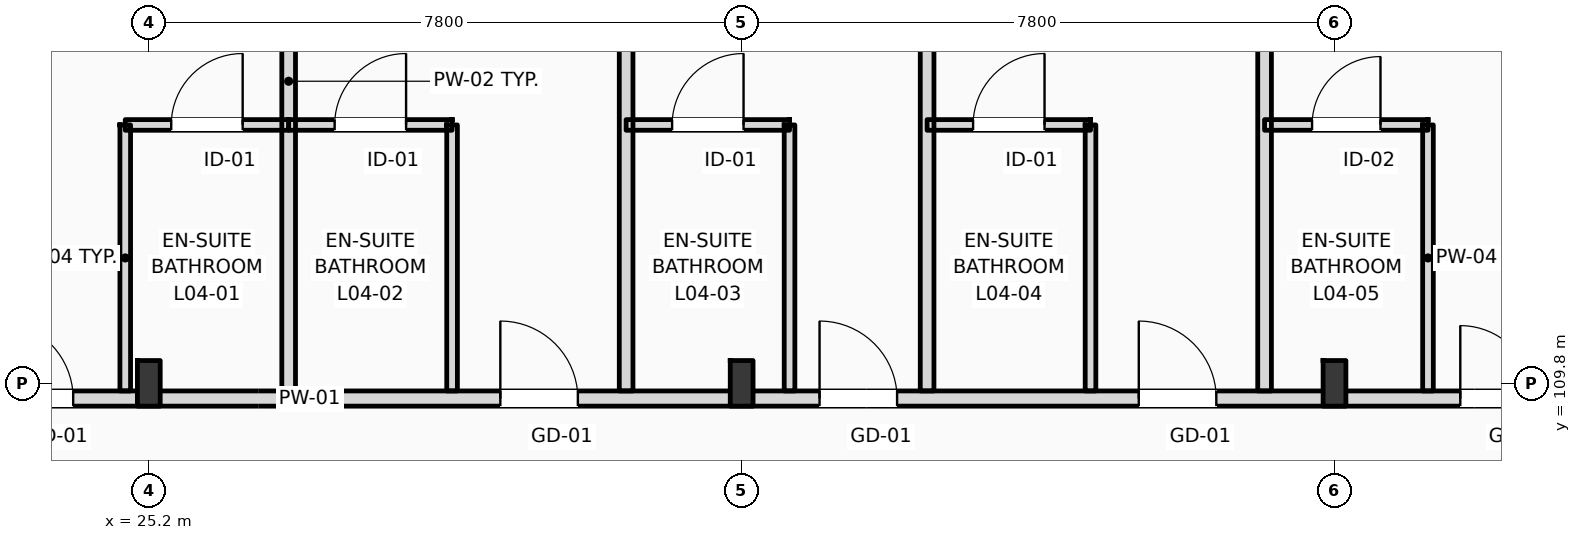
"""IFC4 building model, lengths in metres.
Left out: names, types, materials, properties, quantities, classifications, styles, units other than length and angle.
Written with IfcOpenShell. Run it as: python <this file> out.ifc"""

import sys

from ifc_helpers import new_model, si_unit, direction, frame, frame_2d, origin, origin_2d, place, context, subcontext, project, spatial, rectangle, i_section, extrude, element, fill, save


model = new_model("IFC4")
c1 = context("Model", 3, precision=1e-05, world=origin(), true_north=direction((0.0, 1.0)))
c2 = subcontext(c1, "Body", "Model", "MODEL_VIEW")
j1 = project(units=[si_unit("LENGTHUNIT", "METRE"), si_unit("PLANEANGLEUNIT", "RADIAN")], contexts=[c1])
p1 = place(None, origin())
s1 = spatial("IfcSite", under=j1, at=p1, CompositionType="ELEMENT")
p2 = place(p1, origin())
s2 = spatial("IfcBuilding", under=s1, at=p2, CompositionType="ELEMENT")
p3 = place(p2, frame((0.0, 0.0, 20.4)))
s3 = spatial("IfcBuildingStorey", under=s2, at=p3, CompositionType="ELEMENT", Elevation=20.4)
for number, where, z_axis, x_axis in (
    (1, (25.2, 109.8, 0.0), (0.0, 0.0, 1.0), (1.0, 0.0, 0.0)),
    (2, (33.0, 109.8, 0.0), (0.0, 0.0, 1.0), (1.0, 0.0, 0.0)),
    (3, (40.8, 109.8, 0.0), (0.0, 0.0, 1.0), (1.0, 0.0, 0.0)),
):
    element("IfcColumn", number, at=place(p3, frame(where, z_axis=z_axis, x_axis=x_axis)), inside=s3, PredefinedType="COLUMN", context=c2, shape_type="SweptSolid", body=[
        extrude(i_section(OverallWidth=0.3, OverallDepth=0.6, WebThickness=0.015, FlangeThickness=0.03, FilletRadius=0.027, at=origin_2d()), origin(), (0.0, 0.0, 1.0), 4.2),
    ])
p4 = place(p3, frame((10.65, 109.6, 0.0), z_axis=(0.0, 0.0, 1.0), x_axis=(1.0, 0.0, 0.0)))
e4 = element("IfcWall", 4, at=p4, inside=s3, PredefinedType="PARTITIONING", context=c2, shape_type="SweptSolid", body=[
    extrude(rectangle(XDim=109.21, YDim=0.2, at=frame_2d((54.605, 0.0))), origin(), (0.0, 0.0, 1.0), 3.38),
])
p5 = place(p4, frame((12.535, 0.0, 0.0)))
e5 = element("IfcOpeningElement", 5, at=p5, cuts=e4, PredefinedType="OPENING", context=c2, shape_type="SweptSolid", body=[
    extrude(rectangle(XDim=1.02, YDim=2.2, at=frame_2d((0.51, 1.1))), frame((0.0, 0.11, 0.0), z_axis=(0.0, -1.0, 0.0), x_axis=(1.0, 0.0, 0.0)), (0.0, 0.0, 1.0), 0.22),
])
p6 = place(p4, frame((19.175, 0.0, 0.0)))
e6 = element("IfcOpeningElement", 6, at=p6, cuts=e4, PredefinedType="OPENING", context=c2, shape_type="SweptSolid", body=[
    extrude(rectangle(XDim=1.02, YDim=2.2, at=frame_2d((0.51, 1.1))), frame((0.0, 0.11, 0.0), z_axis=(0.0, -1.0, 0.0), x_axis=(1.0, 0.0, 0.0)), (0.0, 0.0, 1.0), 0.22),
])
p7 = place(p4, frame((23.375, 0.0, 0.0)))
e7 = element("IfcOpeningElement", 7, at=p7, cuts=e4, PredefinedType="OPENING", context=c2, shape_type="SweptSolid", body=[
    extrude(rectangle(XDim=1.02, YDim=2.2, at=frame_2d((0.51, 1.1))), frame((0.0, 0.11, 0.0), z_axis=(0.0, -1.0, 0.0), x_axis=(1.0, 0.0, 0.0)), (0.0, 0.0, 1.0), 0.22),
])
p8 = place(p4, frame((27.575, 0.0, 0.0)))
e8 = element("IfcOpeningElement", 8, at=p8, cuts=e4, PredefinedType="OPENING", context=c2, shape_type="SweptSolid", body=[
    extrude(rectangle(XDim=1.02, YDim=2.2, at=frame_2d((0.51, 1.1))), frame((0.0, 0.11, 0.0), z_axis=(0.0, -1.0, 0.0), x_axis=(1.0, 0.0, 0.0)), (0.0, 0.0, 1.0), 0.22),
])
p9 = place(p4, frame((31.805, 0.0, 0.0)))
e9 = element("IfcOpeningElement", 9, at=p9, cuts=e4, PredefinedType="OPENING", context=c2, shape_type="SweptSolid", body=[
    extrude(rectangle(XDim=0.96, YDim=2.2, at=frame_2d((0.48, 1.1))), frame((0.0, 0.11, 0.0), z_axis=(0.0, -1.0, 0.0), x_axis=(1.0, 0.0, 0.0)), (0.0, 0.0, 1.0), 0.22),
])
p10 = place(p4, frame((33.855, 0.0, 0.0)))
e10 = element("IfcOpeningElement", 10, at=p10, cuts=e4, PredefinedType="OPENING", context=c2, shape_type="SweptSolid", body=[
    extrude(rectangle(XDim=0.96, YDim=2.2, at=frame_2d((0.48, 1.1))), frame((0.0, 0.11, 0.0), z_axis=(0.0, -1.0, 0.0), x_axis=(1.0, 0.0, 0.0)), (0.0, 0.0, 1.0), 0.22),
])
p11 = place(p4, frame((40.205, 0.0, 0.0)))
e11 = element("IfcOpeningElement", 11, at=p11, cuts=e4, PredefinedType="OPENING", context=c2, shape_type="SweptSolid", body=[
    extrude(rectangle(XDim=0.96, YDim=2.2, at=frame_2d((0.48, 1.1))), frame((0.0, 0.11, 0.0), z_axis=(0.0, -1.0, 0.0), x_axis=(1.0, 0.0, 0.0)), (0.0, 0.0, 1.0), 0.22),
])
p12 = place(p4, frame((42.255, 0.0, 0.0)))
e12 = element("IfcOpeningElement", 12, at=p12, cuts=e4, PredefinedType="OPENING", context=c2, shape_type="SweptSolid", body=[
    extrude(rectangle(XDim=0.96, YDim=2.2, at=frame_2d((0.48, 1.1))), frame((0.0, 0.11, 0.0), z_axis=(0.0, -1.0, 0.0), x_axis=(1.0, 0.0, 0.0)), (0.0, 0.0, 1.0), 0.22),
])
p13 = place(p4, frame((48.605, 0.0, 0.0)))
e13 = element("IfcOpeningElement", 13, at=p13, cuts=e4, PredefinedType="OPENING", context=c2, shape_type="SweptSolid", body=[
    extrude(rectangle(XDim=0.96, YDim=2.2, at=frame_2d((0.48, 1.1))), frame((0.0, 0.11, 0.0), z_axis=(0.0, -1.0, 0.0), x_axis=(1.0, 0.0, 0.0)), (0.0, 0.0, 1.0), 0.22),
])
p14 = place(p4, frame((50.655, 0.0, 0.0)))
e14 = element("IfcOpeningElement", 14, at=p14, cuts=e4, PredefinedType="OPENING", context=c2, shape_type="SweptSolid", body=[
    extrude(rectangle(XDim=0.96, YDim=2.2, at=frame_2d((0.48, 1.1))), frame((0.0, 0.11, 0.0), z_axis=(0.0, -1.0, 0.0), x_axis=(1.0, 0.0, 0.0)), (0.0, 0.0, 1.0), 0.22),
])
p15 = place(p4, frame((57.005, 0.0, 0.0)))
e15 = element("IfcOpeningElement", 15, at=p15, cuts=e4, PredefinedType="OPENING", context=c2, shape_type="SweptSolid", body=[
    extrude(rectangle(XDim=0.96, YDim=2.2, at=frame_2d((0.48, 1.1))), frame((0.0, 0.11, 0.0), z_axis=(0.0, -1.0, 0.0), x_axis=(1.0, 0.0, 0.0)), (0.0, 0.0, 1.0), 0.22),
])
p16 = place(p4, frame((59.055, 0.0, 0.0)))
e16 = element("IfcOpeningElement", 16, at=p16, cuts=e4, PredefinedType="OPENING", context=c2, shape_type="SweptSolid", body=[
    extrude(rectangle(XDim=0.96, YDim=2.2, at=frame_2d((0.48, 1.1))), frame((0.0, 0.11, 0.0), z_axis=(0.0, -1.0, 0.0), x_axis=(1.0, 0.0, 0.0)), (0.0, 0.0, 1.0), 0.22),
])
p17 = place(p4, frame((65.405, 0.0, 0.0)))
e17 = element("IfcOpeningElement", 17, at=p17, cuts=e4, PredefinedType="OPENING", context=c2, shape_type="SweptSolid", body=[
    extrude(rectangle(XDim=0.96, YDim=2.2, at=frame_2d((0.48, 1.1))), frame((0.0, 0.11, 0.0), z_axis=(0.0, -1.0, 0.0), x_axis=(1.0, 0.0, 0.0)), (0.0, 0.0, 1.0), 0.22),
])
p18 = place(p4, frame((67.205, 0.0, 0.0)))
e18 = element("IfcOpeningElement", 18, at=p18, cuts=e4, PredefinedType="OPENING", context=c2, shape_type="SweptSolid", body=[
    extrude(rectangle(XDim=0.96, YDim=2.2, at=frame_2d((0.48, 1.1))), frame((0.0, 0.11, 0.0), z_axis=(0.0, -1.0, 0.0), x_axis=(1.0, 0.0, 0.0)), (0.0, 0.0, 1.0), 0.22),
])
p19 = place(p4, frame((73.805, 0.0, 0.0)))
e19 = element("IfcOpeningElement", 19, at=p19, cuts=e4, PredefinedType="OPENING", context=c2, shape_type="SweptSolid", body=[
    extrude(rectangle(XDim=0.96, YDim=2.2, at=frame_2d((0.48, 1.1))), frame((0.0, 0.11, 0.0), z_axis=(0.0, -1.0, 0.0), x_axis=(1.0, 0.0, 0.0)), (0.0, 0.0, 1.0), 0.22),
])
p20 = place(p4, frame((78.255, 0.0, 0.0)))
e20 = element("IfcOpeningElement", 20, at=p20, cuts=e4, PredefinedType="OPENING", context=c2, shape_type="SweptSolid", body=[
    extrude(rectangle(XDim=0.96, YDim=2.2, at=frame_2d((0.48, 1.1))), frame((0.0, 0.11, 0.0), z_axis=(0.0, -1.0, 0.0), x_axis=(1.0, 0.0, 0.0)), (0.0, 0.0, 1.0), 0.22),
])
p21 = place(p4, frame((82.205, 0.0, 0.0)))
e21 = element("IfcOpeningElement", 21, at=p21, cuts=e4, PredefinedType="OPENING", context=c2, shape_type="SweptSolid", body=[
    extrude(rectangle(XDim=0.96, YDim=2.2, at=frame_2d((0.48, 1.1))), frame((0.0, 0.11, 0.0), z_axis=(0.0, -1.0, 0.0), x_axis=(1.0, 0.0, 0.0)), (0.0, 0.0, 1.0), 0.22),
])
p22 = place(p4, frame((86.405, 0.0, 0.0)))
e22 = element("IfcOpeningElement", 22, at=p22, cuts=e4, PredefinedType="OPENING", context=c2, shape_type="SweptSolid", body=[
    extrude(rectangle(XDim=0.96, YDim=2.2, at=frame_2d((0.48, 1.1))), frame((0.0, 0.11, 0.0), z_axis=(0.0, -1.0, 0.0), x_axis=(1.0, 0.0, 0.0)), (0.0, 0.0, 1.0), 0.22),
])
p23 = place(p4, frame((90.605, 0.0, 0.0)))
e23 = element("IfcOpeningElement", 23, at=p23, cuts=e4, PredefinedType="OPENING", context=c2, shape_type="SweptSolid", body=[
    extrude(rectangle(XDim=0.96, YDim=2.2, at=frame_2d((0.48, 1.1))), frame((0.0, 0.11, 0.0), z_axis=(0.0, -1.0, 0.0), x_axis=(1.0, 0.0, 0.0)), (0.0, 0.0, 1.0), 0.22),
])
p24 = place(p4, frame((94.805, 0.0, 0.0)))
e24 = element("IfcOpeningElement", 24, at=p24, cuts=e4, PredefinedType="OPENING", context=c2, shape_type="SweptSolid", body=[
    extrude(rectangle(XDim=0.96, YDim=2.2, at=frame_2d((0.48, 1.1))), frame((0.0, 0.11, 0.0), z_axis=(0.0, -1.0, 0.0), x_axis=(1.0, 0.0, 0.0)), (0.0, 0.0, 1.0), 0.22),
])
p25 = place(p4, frame((99.005, 0.0, 0.0)))
e25 = element("IfcOpeningElement", 25, at=p25, cuts=e4, PredefinedType="OPENING", context=c2, shape_type="SweptSolid", body=[
    extrude(rectangle(XDim=0.96, YDim=2.2, at=frame_2d((0.48, 1.1))), frame((0.0, 0.11, 0.0), z_axis=(0.0, -1.0, 0.0), x_axis=(1.0, 0.0, 0.0)), (0.0, 0.0, 1.0), 0.22),
])
p26 = place(p4, frame((103.205, 0.0, 0.0)))
e26 = element("IfcOpeningElement", 26, at=p26, cuts=e4, PredefinedType="OPENING", context=c2, shape_type="SweptSolid", body=[
    extrude(rectangle(XDim=0.96, YDim=2.2, at=frame_2d((0.48, 1.1))), frame((0.0, 0.11, 0.0), z_axis=(0.0, -1.0, 0.0), x_axis=(1.0, 0.0, 0.0)), (0.0, 0.0, 1.0), 0.22),
])
p27 = place(p4, frame((105.335, 0.0, 0.0)))
e27 = element("IfcOpeningElement", 27, at=p27, cuts=e4, PredefinedType="OPENING", context=c2, shape_type="SweptSolid", body=[
    extrude(rectangle(XDim=0.96, YDim=2.2, at=frame_2d((0.48, 1.1))), frame((0.0, 0.11, 0.0), z_axis=(0.0, -1.0, 0.0), x_axis=(1.0, 0.0, 0.0)), (0.0, 0.0, 1.0), 0.22),
])
p28 = place(p4, frame((2.716, 0.0, 0.0)))
e28 = element("IfcOpeningElement", 28, at=p28, cuts=e4, PredefinedType="OPENING", context=c2, shape_type="SweptSolid", body=[
    extrude(rectangle(XDim=1.35, YDim=2.25, at=frame_2d((0.675, 1.125))), frame((0.0, 0.11, 0.0), z_axis=(0.0, -1.0, 0.0), x_axis=(1.0, 0.0, 0.0)), (0.0, 0.0, 1.0), 0.22),
])
p29 = place(p4, frame((6.65, 0.0, 0.0)))
e29 = element("IfcOpeningElement", 29, at=p29, cuts=e4, PredefinedType="OPENING", context=c2, shape_type="SweptSolid", body=[
    extrude(rectangle(XDim=1.35, YDim=2.25, at=frame_2d((0.675, 1.125))), frame((0.0, 0.11, 0.0), z_axis=(0.0, -1.0, 0.0), x_axis=(1.0, 0.0, 0.0)), (0.0, 0.0, 1.0), 0.22),
])
p30 = place(p4, frame((10.583, 0.0, 0.0)))
e30 = element("IfcOpeningElement", 30, at=p30, cuts=e4, PredefinedType="OPENING", context=c2, shape_type="SweptSolid", body=[
    extrude(rectangle(XDim=1.35, YDim=2.25, at=frame_2d((0.675, 1.125))), frame((0.0, 0.11, 0.0), z_axis=(0.0, -1.0, 0.0), x_axis=(1.0, 0.0, 0.0)), (0.0, 0.0, 1.0), 0.22),
])
p31 = place(p3, frame((27.04, 109.7, 0.0), z_axis=(0.0, 0.0, 1.0), x_axis=(0.0, 1.0, 0.0)))
e31 = element("IfcWall", 31, at=p31, inside=s3, PredefinedType="PARTITIONING", context=c2, shape_type="SweptSolid", body=[
    extrude(rectangle(XDim=8.15, YDim=0.18, at=frame_2d((4.075, 0.0))), origin(), (0.0, 0.0, 1.0), 3.94),
])
p32 = place(p3, frame((24.89, 109.7, 0.0), z_axis=(0.0, 0.0, 1.0), x_axis=(0.0, 1.0, 0.0)))
e32 = element("IfcWall", 32, at=p32, inside=s3, PredefinedType="PARTITIONING", context=c2, shape_type="SweptSolid", body=[
    extrude(rectangle(XDim=3.5, YDim=0.14, at=frame_2d((1.75, 0.0))), origin(), (0.0, 0.0, 1.0), 3.94),
])
p33 = place(p3, frame((24.89, 113.2, 0.0), z_axis=(0.0, 0.0, 1.0), x_axis=(1.0, 0.0, 0.0)))
e33 = element("IfcWall", 33, at=p33, inside=s3, PredefinedType="PARTITIONING", context=c2, shape_type="SweptSolid", body=[
    extrude(rectangle(XDim=2.15, YDim=0.14, at=frame_2d((1.075, 0.0))), origin(), (0.0, 0.0, 1.0), 3.94),
])
p34 = place(p33, frame((0.605, 0.0, 0.0)))
e34 = element("IfcOpeningElement", 34, at=p34, cuts=e33, PredefinedType="OPENING", context=c2, shape_type="SweptSolid", body=[
    extrude(rectangle(XDim=0.94, YDim=2.15, at=frame_2d((0.47, 1.075))), frame((0.0, 0.08, 0.0), z_axis=(0.0, -1.0, 0.0), x_axis=(1.0, 0.0, 0.0)), (0.0, 0.0, 1.0), 0.16),
])
p35 = place(p3, frame((31.48, 109.7, 0.0), z_axis=(0.0, 0.0, 1.0), x_axis=(0.0, 1.0, 0.0)))
e35 = element("IfcWall", 35, at=p35, inside=s3, PredefinedType="PARTITIONING", context=c2, shape_type="SweptSolid", body=[
    extrude(rectangle(XDim=8.15, YDim=0.18, at=frame_2d((4.075, 0.0))), origin(), (0.0, 0.0, 1.0), 3.94),
])
p36 = place(p3, frame((29.19, 109.7, 0.0), z_axis=(0.0, 0.0, 1.0), x_axis=(0.0, 1.0, 0.0)))
e36 = element("IfcWall", 36, at=p36, inside=s3, PredefinedType="PARTITIONING", context=c2, shape_type="SweptSolid", body=[
    extrude(rectangle(XDim=3.5, YDim=0.14, at=frame_2d((1.75, 0.0))), origin(), (0.0, 0.0, 1.0), 3.94),
])
p37 = place(p3, frame((27.04, 113.2, 0.0), z_axis=(0.0, 0.0, 1.0), x_axis=(1.0, 0.0, 0.0)))
e37 = element("IfcWall", 37, at=p37, inside=s3, PredefinedType="PARTITIONING", context=c2, shape_type="SweptSolid", body=[
    extrude(rectangle(XDim=2.15, YDim=0.14, at=frame_2d((1.075, 0.0))), origin(), (0.0, 0.0, 1.0), 3.94),
])
p38 = place(p37, frame((0.605, 0.0, 0.0)))
e38 = element("IfcOpeningElement", 38, at=p38, cuts=e37, PredefinedType="OPENING", context=c2, shape_type="SweptSolid", body=[
    extrude(rectangle(XDim=0.94, YDim=2.15, at=frame_2d((0.47, 1.075))), frame((0.0, 0.08, 0.0), z_axis=(0.0, -1.0, 0.0), x_axis=(1.0, 0.0, 0.0)), (0.0, 0.0, 1.0), 0.16),
])
p39 = place(p3, frame((35.44, 109.7, 0.0), z_axis=(0.0, 0.0, 1.0), x_axis=(0.0, 1.0, 0.0)))
e39 = element("IfcWall", 39, at=p39, inside=s3, PredefinedType="PARTITIONING", context=c2, shape_type="SweptSolid", body=[
    extrude(rectangle(XDim=8.15, YDim=0.18, at=frame_2d((4.075, 0.0))), origin(), (0.0, 0.0, 1.0), 3.63),
])
p40 = place(p3, frame((33.63, 109.7, 0.0), z_axis=(0.0, 0.0, 1.0), x_axis=(0.0, 1.0, 0.0)))
e40 = element("IfcWall", 40, at=p40, inside=s3, PredefinedType="PARTITIONING", context=c2, shape_type="SweptSolid", body=[
    extrude(rectangle(XDim=3.5, YDim=0.14, at=frame_2d((1.75, 0.0))), origin(), (0.0, 0.0, 1.0), 3.94),
])
p41 = place(p3, frame((31.48, 113.2, 0.0), z_axis=(0.0, 0.0, 1.0), x_axis=(1.0, 0.0, 0.0)))
e41 = element("IfcWall", 41, at=p41, inside=s3, PredefinedType="PARTITIONING", context=c2, shape_type="SweptSolid", body=[
    extrude(rectangle(XDim=2.15, YDim=0.14, at=frame_2d((1.075, 0.0))), origin(), (0.0, 0.0, 1.0), 3.94),
])
p42 = place(p41, frame((0.605, 0.0, 0.0)))
e42 = element("IfcOpeningElement", 42, at=p42, cuts=e41, PredefinedType="OPENING", context=c2, shape_type="SweptSolid", body=[
    extrude(rectangle(XDim=0.94, YDim=2.15, at=frame_2d((0.47, 1.075))), frame((0.0, 0.08, 0.0), z_axis=(0.0, -1.0, 0.0), x_axis=(1.0, 0.0, 0.0)), (0.0, 0.0, 1.0), 0.16),
])
p43 = place(p3, frame((39.88, 109.7, 0.0), z_axis=(0.0, 0.0, 1.0), x_axis=(0.0, 1.0, 0.0)))
e43 = element("IfcWall", 43, at=p43, inside=s3, PredefinedType="PARTITIONING", context=c2, shape_type="SweptSolid", body=[
    extrude(rectangle(XDim=8.15, YDim=0.18, at=frame_2d((4.075, 0.0))), origin(), (0.0, 0.0, 1.0), 3.94),
])
p44 = place(p3, frame((37.59, 109.7, 0.0), z_axis=(0.0, 0.0, 1.0), x_axis=(0.0, 1.0, 0.0)))
e44 = element("IfcWall", 44, at=p44, inside=s3, PredefinedType="PARTITIONING", context=c2, shape_type="SweptSolid", body=[
    extrude(rectangle(XDim=3.5, YDim=0.14, at=frame_2d((1.75, 0.0))), origin(), (0.0, 0.0, 1.0), 3.94),
])
p45 = place(p3, frame((35.44, 113.2, 0.0), z_axis=(0.0, 0.0, 1.0), x_axis=(1.0, 0.0, 0.0)))
e45 = element("IfcWall", 45, at=p45, inside=s3, PredefinedType="PARTITIONING", context=c2, shape_type="SweptSolid", body=[
    extrude(rectangle(XDim=2.15, YDim=0.14, at=frame_2d((1.075, 0.0))), origin(), (0.0, 0.0, 1.0), 3.94),
])
p46 = place(p45, frame((0.605, 0.0, 0.0)))
e46 = element("IfcOpeningElement", 46, at=p46, cuts=e45, PredefinedType="OPENING", context=c2, shape_type="SweptSolid", body=[
    extrude(rectangle(XDim=0.94, YDim=2.15, at=frame_2d((0.47, 1.075))), frame((0.0, 0.08, 0.0), z_axis=(0.0, -1.0, 0.0), x_axis=(1.0, 0.0, 0.0)), (0.0, 0.0, 1.0), 0.16),
])
p47 = place(p3, frame((42.03, 109.7, 0.0), z_axis=(0.0, 0.0, 1.0), x_axis=(0.0, 1.0, 0.0)))
e47 = element("IfcWall", 47, at=p47, inside=s3, PredefinedType="PARTITIONING", context=c2, shape_type="SweptSolid", body=[
    extrude(rectangle(XDim=3.5, YDim=0.14, at=frame_2d((1.75, 0.0))), origin(), (0.0, 0.0, 1.0), 3.94),
])
p48 = place(p3, frame((39.88, 113.2, 0.0), z_axis=(0.0, 0.0, 1.0), x_axis=(1.0, 0.0, 0.0)))
e48 = element("IfcWall", 48, at=p48, inside=s3, PredefinedType="PARTITIONING", context=c2, shape_type="SweptSolid", body=[
    extrude(rectangle(XDim=2.15, YDim=0.14, at=frame_2d((1.075, 0.0))), origin(), (0.0, 0.0, 1.0), 3.94),
])
p49 = place(p48, frame((0.625, 0.0, 0.0)))
e49 = element("IfcOpeningElement", 49, at=p49, cuts=e48, PredefinedType="OPENING", context=c2, shape_type="SweptSolid", body=[
    extrude(rectangle(XDim=0.9, YDim=2.1, at=frame_2d((0.45, 1.05))), frame((0.0, 0.08, 0.0), z_axis=(0.0, -1.0, 0.0), x_axis=(1.0, 0.0, 0.0)), (0.0, 0.0, 1.0), 0.16),
])
p50 = place(p5, origin())
e50 = element("IfcDoor", 50, at=p50, inside=s3, OperationType="SINGLE_SWING_LEFT", PredefinedType="DOOR", context=c2, shape_type="SweptSolid", body=[
    extrude(rectangle(XDim=1.02, YDim=2.2, at=frame_2d((0.51, 1.1))), frame((0.0, 0.025, 0.0), z_axis=(0.0, -1.0, 0.0), x_axis=(1.0, 0.0, 0.0)), (0.0, 0.0, 1.0), 0.05),
])
fill(e5, e50)
p51 = place(p34, origin())
e51 = element("IfcDoor", 51, at=p51, inside=s3, OperationType="SINGLE_SWING_RIGHT", PredefinedType="DOOR", context=c2, shape_type="SweptSolid", body=[
    extrude(rectangle(XDim=0.94, YDim=2.15, at=frame_2d((0.47, 1.075))), frame((0.0, 0.025, 0.0), z_axis=(0.0, -1.0, 0.0), x_axis=(1.0, 0.0, 0.0)), (0.0, 0.0, 1.0), 0.05),
])
fill(e34, e51)
p52 = place(p6, origin())
e52 = element("IfcDoor", 52, at=p52, inside=s3, OperationType="SINGLE_SWING_LEFT", PredefinedType="DOOR", context=c2, shape_type="SweptSolid", body=[
    extrude(rectangle(XDim=1.02, YDim=2.2, at=frame_2d((0.51, 1.1))), frame((0.0, 0.025, 0.0), z_axis=(0.0, -1.0, 0.0), x_axis=(1.0, 0.0, 0.0)), (0.0, 0.0, 1.0), 0.05),
])
fill(e6, e52)
p53 = place(p38, origin())
e53 = element("IfcDoor", 53, at=p53, inside=s3, OperationType="SINGLE_SWING_RIGHT", PredefinedType="DOOR", context=c2, shape_type="SweptSolid", body=[
    extrude(rectangle(XDim=0.94, YDim=2.15, at=frame_2d((0.47, 1.075))), frame((0.0, 0.025, 0.0), z_axis=(0.0, -1.0, 0.0), x_axis=(1.0, 0.0, 0.0)), (0.0, 0.0, 1.0), 0.05),
])
fill(e38, e53)
p54 = place(p7, origin())
e54 = element("IfcDoor", 54, at=p54, inside=s3, OperationType="SINGLE_SWING_LEFT", PredefinedType="DOOR", context=c2, shape_type="SweptSolid", body=[
    extrude(rectangle(XDim=1.02, YDim=2.2, at=frame_2d((0.51, 1.1))), frame((0.0, 0.025, 0.0), z_axis=(0.0, -1.0, 0.0), x_axis=(1.0, 0.0, 0.0)), (0.0, 0.0, 1.0), 0.05),
])
fill(e7, e54)
p55 = place(p42, origin())
e55 = element("IfcDoor", 55, at=p55, inside=s3, OperationType="SINGLE_SWING_RIGHT", PredefinedType="DOOR", context=c2, shape_type="SweptSolid", body=[
    extrude(rectangle(XDim=0.94, YDim=2.15, at=frame_2d((0.47, 1.075))), frame((0.0, 0.025, 0.0), z_axis=(0.0, -1.0, 0.0), x_axis=(1.0, 0.0, 0.0)), (0.0, 0.0, 1.0), 0.05),
])
fill(e42, e55)
p56 = place(p8, origin())
e56 = element("IfcDoor", 56, at=p56, inside=s3, OperationType="SINGLE_SWING_LEFT", PredefinedType="DOOR", context=c2, shape_type="SweptSolid", body=[
    extrude(rectangle(XDim=1.02, YDim=2.2, at=frame_2d((0.51, 1.1))), frame((0.0, 0.025, 0.0), z_axis=(0.0, -1.0, 0.0), x_axis=(1.0, 0.0, 0.0)), (0.0, 0.0, 1.0), 0.05),
])
fill(e8, e56)
p57 = place(p46, origin())
e57 = element("IfcDoor", 57, at=p57, inside=s3, OperationType="SINGLE_SWING_RIGHT", PredefinedType="DOOR", context=c2, shape_type="SweptSolid", body=[
    extrude(rectangle(XDim=0.94, YDim=2.15, at=frame_2d((0.47, 1.075))), frame((0.0, 0.025, 0.0), z_axis=(0.0, -1.0, 0.0), x_axis=(1.0, 0.0, 0.0)), (0.0, 0.0, 1.0), 0.05),
])
fill(e46, e57)
p58 = place(p9, origin())
e58 = element("IfcDoor", 58, at=p58, inside=s3, OperationType="SINGLE_SWING_LEFT", PredefinedType="DOOR", context=c2, shape_type="SweptSolid", body=[
    extrude(rectangle(XDim=0.96, YDim=2.2, at=frame_2d((0.48, 1.1))), frame((0.0, 0.025, 0.0), z_axis=(0.0, -1.0, 0.0), x_axis=(1.0, 0.0, 0.0)), (0.0, 0.0, 1.0), 0.05),
])
fill(e9, e58)
p59 = place(p49, origin())
e59 = element("IfcDoor", 59, at=p59, inside=s3, OperationType="SINGLE_SWING_RIGHT", PredefinedType="DOOR", context=c2, shape_type="SweptSolid", body=[
    extrude(rectangle(XDim=0.9, YDim=2.1, at=frame_2d((0.45, 1.05))), frame((0.0, 0.025, 0.0), z_axis=(0.0, -1.0, 0.0), x_axis=(1.0, 0.0, 0.0)), (0.0, 0.0, 1.0), 0.05),
])
fill(e49, e59)
save(model, sys.argv[1])
